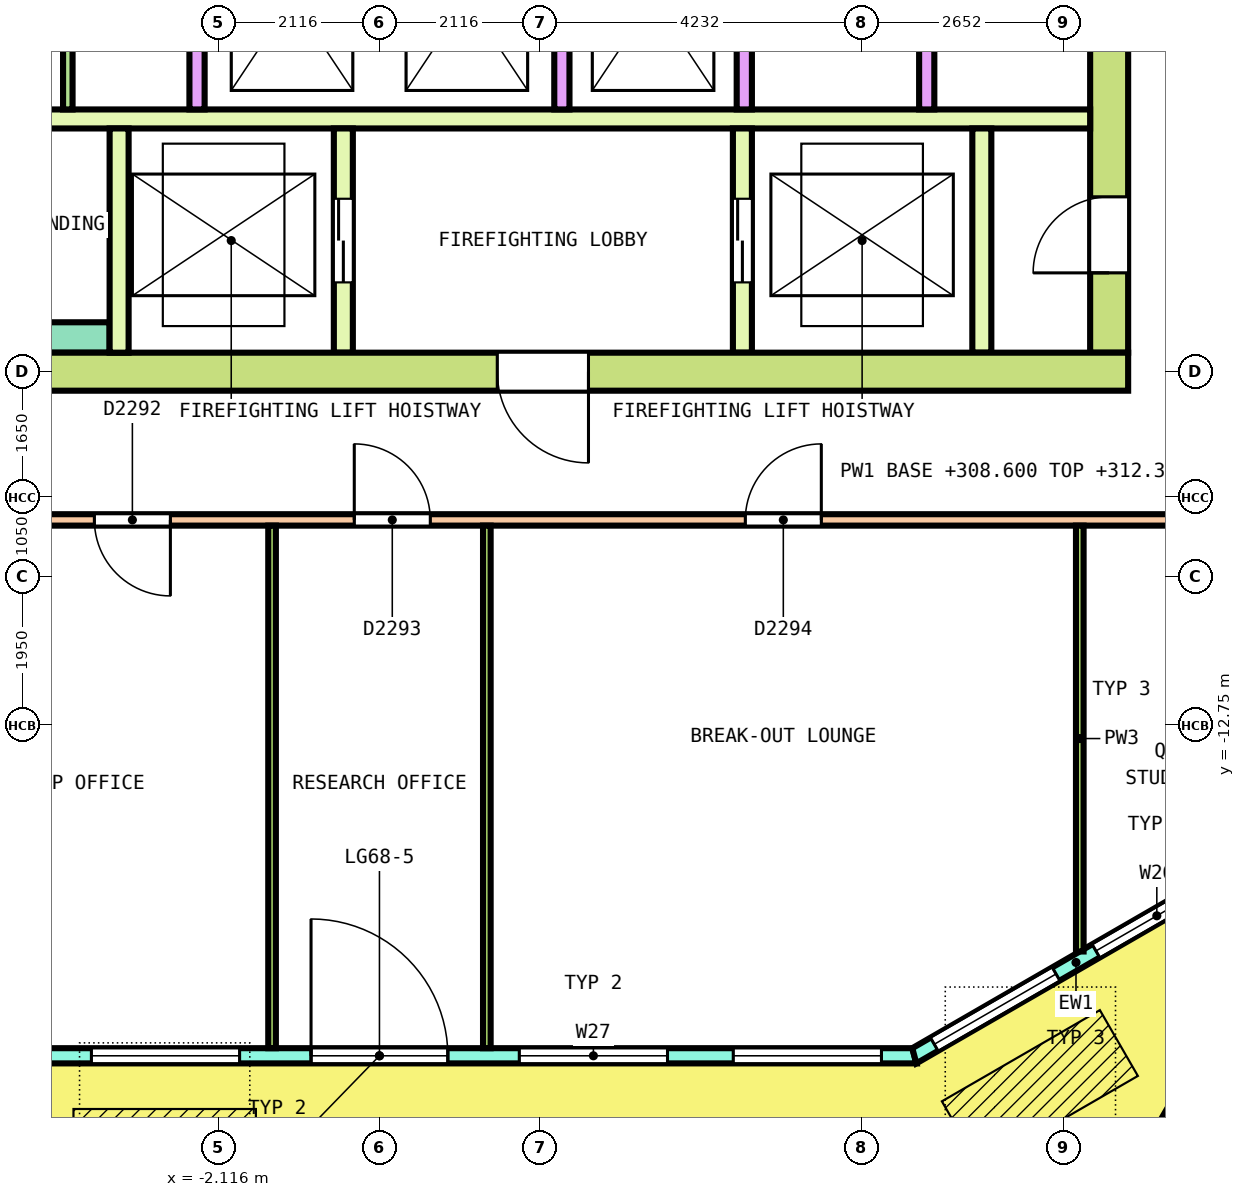
"""IFC4 building model, lengths in metres.
Left out: names, types, materials, properties, quantities, classifications, styles, units other than length and angle.
Written with IfcOpenShell. Run it as: python <this file> out.ifc"""

import sys

from ifc_helpers import new_model, si_unit, direction, frame, frame_2d, origin, origin_2d, place, context, subcontext, project, spatial, polyline, rectangle, outline, extrude, element, fill, save


model = new_model("IFC4")
c1 = context("Model", 3, precision=1e-05, world=origin(), true_north=direction((0.0, 1.0)))
c2 = subcontext(c1, "Body", "Model", "MODEL_VIEW")
j1 = project(units=[si_unit("LENGTHUNIT", "METRE"), si_unit("PLANEANGLEUNIT", "RADIAN")], contexts=[c1])
p1 = place(None, origin())
s1 = spatial("IfcSite", under=j1, at=p1, CompositionType="ELEMENT")
p2 = place(p1, origin())
s2 = spatial("IfcBuilding", under=s1, at=p2, CompositionType="ELEMENT")
p3 = place(p2, frame((0.0, 0.0, 308.6)))
s3 = spatial("IfcBuildingStorey", under=s2, at=p3, CompositionType="ELEMENT", Elevation=308.6)
p4 = place(p3, frame((10.564, -18.297, 0.0), z_axis=(-0.018115203871, -0.031350666477, 0.999344272561), x_axis=(0.865981217505, 0.499092579547, 0.031354871555)))
e1 = element("IfcColumn", 1, at=p4, inside=s3, PredefinedType="COLUMN", context=c2, shape_type="SweptSolid", body=[
    extrude(rectangle(XDim=0.85, YDim=0.85, at=origin_2d()), origin(), (0.0, 0.0, 1.0), 3.652),
])
p5 = place(p3, frame((-7.037, -17.1, 0.0), z_axis=(0.0, 0.0, 1.0), x_axis=(1.0, 0.0, 0.0)))
e2 = element("IfcWall", 2, at=p5, inside=s3, PredefinedType="SOLIDWALL", context=c2, shape_type="SweptSolid", body=[
    extrude(outline(polyline([(-0.027, -0.1), (0.982, -0.1), (1.991, -0.1), (3.0, -0.1), (4.01, -0.1), (5.019, -0.1), (6.028, -0.1), (7.037, -0.1), (8.046, -0.1), (9.055, -0.1), (10.064, -0.1), (11.074, -0.1), (12.083, -0.1), (13.092, -0.1), (14.101, -0.1), (14.047, 0.1), (13.046, 0.1), (12.044, 0.1), (11.043, 0.1), (10.042, 0.1), (9.04, 0.1), (8.039, 0.1), (7.037, 0.1), (6.036, 0.1), (5.034, 0.1), (4.033, 0.1), (3.031, 0.1), (2.03, 0.1), (1.028, 0.1), (0.027, 0.1), (-0.027, -0.1)])), origin(), (0.0, 0.0, 1.0), 3.7),
])
p6 = place(p5, frame((0.432, 0.0, 0.1)))
e3 = element("IfcOpeningElement", 3, at=p6, cuts=e2, PredefinedType="OPENING", context=c2, shape_type="SweptSolid", body=[
    extrude(rectangle(XDim=1.95, YDim=2.9, at=frame_2d((0.975, 1.45))), frame((0.0, 0.11, 0.0), z_axis=(0.0, -1.0, 0.0), x_axis=(1.0, 0.0, 0.0)), (0.0, 0.0, 1.0), 0.22),
])
p7 = place(p5, frame((3.247, 0.0, 0.1)))
e4 = element("IfcOpeningElement", 4, at=p7, cuts=e2, PredefinedType="OPENING", context=c2, shape_type="SweptSolid", body=[
    extrude(rectangle(XDim=1.95, YDim=2.9, at=frame_2d((0.975, 1.45))), frame((0.0, 0.11, 0.0), z_axis=(0.0, -1.0, 0.0), x_axis=(1.0, 0.0, 0.0)), (0.0, 0.0, 1.0), 0.22),
])
p8 = place(p5, frame((6.137, 0.0, 0.0)))
e5 = element("IfcOpeningElement", 5, at=p8, cuts=e2, PredefinedType="OPENING", context=c2, shape_type="SweptSolid", body=[
    extrude(rectangle(XDim=1.8, YDim=2.4, at=frame_2d((0.9, 1.2))), frame((0.0, 0.11, 0.0), z_axis=(0.0, -1.0, 0.0), x_axis=(1.0, 0.0, 0.0)), (0.0, 0.0, 1.0), 0.22),
])
p9 = place(p5, frame((6.137, 0.0, 2.55)))
e6 = element("IfcOpeningElement", 6, at=p9, cuts=e2, PredefinedType="OPENING", context=c2, shape_type="SweptSolid", body=[
    extrude(rectangle(XDim=1.8, YDim=0.45, at=frame_2d((0.9, 0.225))), frame((0.0, 0.11, 0.0), z_axis=(0.0, -1.0, 0.0), x_axis=(1.0, 0.0, 0.0)), (0.0, 0.0, 1.0), 0.22),
])
p10 = place(p5, frame((8.877, 0.0, 0.1)))
e7 = element("IfcOpeningElement", 7, at=p10, cuts=e2, PredefinedType="OPENING", context=c2, shape_type="SweptSolid", body=[
    extrude(rectangle(XDim=1.95, YDim=2.9, at=frame_2d((0.975, 1.45))), frame((0.0, 0.11, 0.0), z_axis=(0.0, -1.0, 0.0), x_axis=(1.0, 0.0, 0.0)), (0.0, 0.0, 1.0), 0.22),
])
p11 = place(p5, frame((11.691, 0.0, 0.1)))
e8 = element("IfcOpeningElement", 8, at=p11, cuts=e2, PredefinedType="OPENING", context=c2, shape_type="SweptSolid", body=[
    extrude(rectangle(XDim=1.95, YDim=2.9, at=frame_2d((0.975, 1.45))), frame((0.0, 0.11, 0.0), z_axis=(0.0, -1.0, 0.0), x_axis=(1.0, 0.0, 0.0)), (0.0, 0.0, 1.0), 0.22),
])
p12 = place(p3, frame((7.037, -17.1, 0.0), z_axis=(0.0, 0.0, 1.0), x_axis=(0.86601671623, 0.500015046984, 0.0)))
e9 = element("IfcWall", 9, at=p12, inside=s3, PredefinedType="SOLIDWALL", context=c2, shape_type="SweptSolid", body=[
    extrude(outline(polyline([(-0.027, -0.1), (1.214, -0.1), (2.456, -0.1), (3.697, -0.1), (4.938, -0.1), (4.885, 0.1), (3.67, 0.1), (2.456, 0.1), (1.241, 0.1), (0.027, 0.1), (-0.027, -0.1)])), origin(), (0.0, 0.0, 1.0), 3.7),
])
p13 = place(p12, frame((0.303, 0.0, 0.1)))
e10 = element("IfcOpeningElement", 10, at=p13, cuts=e9, PredefinedType="OPENING", context=c2, shape_type="SweptSolid", body=[
    extrude(rectangle(XDim=1.85, YDim=2.9, at=frame_2d((0.925, 1.45))), frame((0.0, 0.11, 0.0), z_axis=(0.0, -1.0, 0.0), x_axis=(1.0, 0.0, 0.0)), (0.0, 0.0, 1.0), 0.22),
])
p14 = place(p12, frame((2.759, 0.0, 0.1)))
e11 = element("IfcOpeningElement", 11, at=p14, cuts=e9, PredefinedType="OPENING", context=c2, shape_type="SweptSolid", body=[
    extrude(rectangle(XDim=1.85, YDim=2.9, at=frame_2d((0.925, 1.45))), frame((0.0, 0.11, 0.0), z_axis=(0.0, -1.0, 0.0), x_axis=(1.0, 0.0, 0.0)), (0.0, 0.0, 1.0), 0.22),
])
p15 = place(p3, frame((-9.85, -8.1, 0.0), z_axis=(0.0, 0.0, 1.0), x_axis=(1.0, 0.0, 0.0)))
e12 = element("IfcWall", 12, at=p15, inside=s3, PredefinedType="SHEAR", context=c2, shape_type="SweptSolid", body=[
    extrude(rectangle(XDim=19.7, YDim=0.5, at=frame_2d((9.85, 0.0))), origin(), (0.0, 0.0, 1.0), 3.7),
])
p16 = place(p15, frame((11.4, 0.0, 0.0)))
e13 = element("IfcOpeningElement", 13, at=p16, cuts=e12, PredefinedType="OPENING", context=c2, shape_type="SweptSolid", body=[
    extrude(rectangle(XDim=1.2, YDim=2.1, at=frame_2d((0.6, 1.05))), frame((0.0, 0.26, 0.0), z_axis=(0.0, -1.0, 0.0), x_axis=(1.0, 0.0, 0.0)), (0.0, 0.0, 1.0), 0.52),
])
p17 = place(p3, frame((9.6, -7.85, 0.0), z_axis=(0.0, 0.0, 1.0), x_axis=(0.0, 1.0, 0.0)))
e14 = element("IfcWall", 14, at=p17, inside=s3, PredefinedType="SHEAR", context=c2, shape_type="SweptSolid", body=[
    extrude(rectangle(XDim=15.7, YDim=0.5, at=frame_2d((7.85, 0.0))), origin(), (0.0, 0.0, 1.0), 3.7),
])
p18 = place(p17, frame((6.65, 0.0, 0.0)))
e15 = element("IfcOpeningElement", 15, at=p18, cuts=e14, PredefinedType="OPENING", context=c2, shape_type="SweptSolid", body=[
    extrude(rectangle(XDim=2.4, YDim=2.1, at=frame_2d((1.2, 1.05))), frame((0.0, 0.26, 0.0), z_axis=(0.0, -1.0, 0.0), x_axis=(1.0, 0.0, 0.0)), (0.0, 0.0, 1.0), 0.52),
])
p19 = place(p17, frame((13.55, 0.0, 0.0)))
e16 = element("IfcOpeningElement", 16, at=p19, cuts=e14, PredefinedType="OPENING", context=c2, shape_type="SweptSolid", body=[
    extrude(rectangle(XDim=1.2, YDim=2.1, at=frame_2d((0.6, 1.05))), frame((0.0, 0.26, 0.0), z_axis=(0.0, -1.0, 0.0), x_axis=(1.0, 0.0, 0.0)), (0.0, 0.0, 1.0), 0.52),
])
p20 = place(p17, frame((1.05, 0.0, 0.0)))
e17 = element("IfcOpeningElement", 17, at=p20, cuts=e14, PredefinedType="OPENING", context=c2, shape_type="SweptSolid", body=[
    extrude(rectangle(XDim=1.0, YDim=2.1, at=frame_2d((0.5, 1.05))), frame((0.0, 0.26, 0.0), z_axis=(0.0, -1.0, 0.0), x_axis=(1.0, 0.0, 0.0)), (0.0, 0.0, 1.0), 0.52),
])
p21 = place(p3, frame((-9.35, -4.775, 0.0), z_axis=(0.0, 0.0, 1.0), x_axis=(1.0, 0.0, 0.0)))
e18 = element("IfcWall", 18, at=p21, inside=s3, PredefinedType="SOLIDWALL", context=c2, shape_type="SweptSolid", body=[
    extrude(rectangle(XDim=18.7, YDim=0.25, at=frame_2d((9.35, 0.0))), origin(), (0.0, 0.0, 1.0), 3.7),
])
for number, where, z_axis, x_axis in (
    (19, (-2.4, -4.65, 0.0), (0.0, 0.0, 1.0), (0.0, 1.0, 0.0)),
    (20, (2.4, -4.65, 0.0), (0.0, 0.0, 1.0), (0.0, 1.0, 0.0)),
    (21, (4.8, -4.65, 0.0), (0.0, 0.0, 1.0), (0.0, 1.0, 0.0)),
    (22, (7.2, -4.65, 0.0), (0.0, 0.0, 1.0), (0.0, 1.0, 0.0)),
):
    element("IfcWall", number, at=place(p3, frame(where, z_axis=z_axis, x_axis=x_axis)), inside=s3, PredefinedType="SOLIDWALL", context=c2, shape_type="SweptSolid", body=[
        extrude(rectangle(XDim=2.9, YDim=0.2, at=frame_2d((1.45, 0.0))), origin(), (0.0, 0.0, 1.0), 3.7),
    ])
p22 = place(p3, frame((-9.35, -7.65, 0.0), z_axis=(0.0, 0.0, 1.0), x_axis=(1.0, 0.0, 0.0)))
e23 = element("IfcWall", 23, at=p22, inside=s3, PredefinedType="SOLIDWALL", context=c2, shape_type="SweptSolid", body=[
    extrude(rectangle(XDim=5.8, YDim=0.4, at=frame_2d((2.9, 0.0))), origin(), (0.0, 0.0, 1.0), 3.7),
])
p23 = place(p3, frame((-3.425, -7.85, 0.0), z_axis=(0.0, 0.0, 1.0), x_axis=(0.0, 1.0, 0.0)))
e24 = element("IfcWall", 24, at=p23, inside=s3, PredefinedType="SOLIDWALL", context=c2, shape_type="SweptSolid", body=[
    extrude(rectangle(XDim=2.95, YDim=0.25, at=frame_2d((1.475, 0.0))), origin(), (0.0, 0.0, 1.0), 3.7),
])
p24 = place(p3, frame((-0.475, -7.85, 0.0), z_axis=(0.0, 0.0, 1.0), x_axis=(0.0, 1.0, 0.0)))
e25 = element("IfcWall", 25, at=p24, inside=s3, PredefinedType="SOLIDWALL", context=c2, shape_type="SweptSolid", body=[
    extrude(rectangle(XDim=2.95, YDim=0.25, at=frame_2d((1.475, 0.0))), origin(), (0.0, 0.0, 1.0), 3.7),
])
p25 = place(p24, frame((0.925, 0.0, 0.0)))
e26 = element("IfcOpeningElement", 26, at=p25, cuts=e25, PredefinedType="OPENING", context=c2, shape_type="SweptSolid", body=[
    extrude(rectangle(XDim=1.1, YDim=2.1, at=frame_2d((0.55, 1.05))), frame((0.0, 0.135, 0.0), z_axis=(0.0, -1.0, 0.0), x_axis=(1.0, 0.0, 0.0)), (0.0, 0.0, 1.0), 0.27),
])
p26 = place(p3, frame((4.775, -7.85, 0.0), z_axis=(0.0, 0.0, 1.0), x_axis=(0.0, 1.0, 0.0)))
e27 = element("IfcWall", 27, at=p26, inside=s3, PredefinedType="SOLIDWALL", context=c2, shape_type="SweptSolid", body=[
    extrude(rectangle(XDim=2.95, YDim=0.25, at=frame_2d((1.475, 0.0))), origin(), (0.0, 0.0, 1.0), 3.7),
])
p27 = place(p26, frame((0.925, 0.0, 0.0)))
e28 = element("IfcOpeningElement", 28, at=p27, cuts=e27, PredefinedType="OPENING", context=c2, shape_type="SweptSolid", body=[
    extrude(rectangle(XDim=1.1, YDim=2.1, at=frame_2d((0.55, 1.05))), frame((0.0, 0.135, 0.0), z_axis=(0.0, -1.0, 0.0), x_axis=(1.0, 0.0, 0.0)), (0.0, 0.0, 1.0), 0.27),
])
p28 = place(p3, frame((7.925, -7.85, 0.0), z_axis=(0.0, 0.0, 1.0), x_axis=(0.0, 1.0, 0.0)))
e29 = element("IfcWall", 29, at=p28, inside=s3, PredefinedType="SOLIDWALL", context=c2, shape_type="SweptSolid", body=[
    extrude(rectangle(XDim=2.95, YDim=0.25, at=frame_2d((1.475, 0.0))), origin(), (0.0, 0.0, 1.0), 3.7),
])
p29 = place(p3, frame((-4.1, -4.65, 0.0), z_axis=(0.0, 0.0, 1.0), x_axis=(0.0, 1.0, 0.0)))
e30 = element("IfcWall", 30, at=p29, inside=s3, PredefinedType="PARTITIONING", context=c2, shape_type="SweptSolid", body=[
    extrude(rectangle(XDim=2.9, YDim=0.125, at=frame_2d((1.45, 0.0))), origin(), (0.0, 0.0, 1.0), 3.7),
])
p30 = place(p3, frame((-10.9, -10.05, 0.0), z_axis=(0.0, 0.0, 1.0), x_axis=(1.0, 0.0, 0.0)))
e31 = element("IfcWall", 31, at=p30, inside=s3, PredefinedType="PARTITIONING", context=c2, shape_type="SweptSolid", body=[
    extrude(rectangle(XDim=21.925, YDim=0.15, at=frame_2d((10.962, 0.0))), origin(), (0.0, 0.0, 1.0), 3.05),
])
p31 = place(p30, frame((1.94, 0.0, 0.0)))
e32 = element("IfcOpeningElement", 32, at=p31, cuts=e31, PredefinedType="OPENING", context=c2, shape_type="SweptSolid", body=[
    extrude(rectangle(XDim=1.0, YDim=2.1, at=frame_2d((0.5, 1.05))), frame((0.0, 0.085, 0.0), z_axis=(0.0, -1.0, 0.0), x_axis=(1.0, 0.0, 0.0)), (0.0, 0.0, 1.0), 0.17),
])
p32 = place(p30, frame((7.149, 0.0, 0.0)))
e33 = element("IfcOpeningElement", 33, at=p32, cuts=e31, PredefinedType="OPENING", context=c2, shape_type="SweptSolid", body=[
    extrude(rectangle(XDim=1.0, YDim=2.1, at=frame_2d((0.5, 1.05))), frame((0.0, 0.085, 0.0), z_axis=(0.0, -1.0, 0.0), x_axis=(1.0, 0.0, 0.0)), (0.0, 0.0, 1.0), 0.17),
])
p33 = place(p30, frame((10.569, 0.0, 0.0)))
e34 = element("IfcOpeningElement", 34, at=p33, cuts=e31, PredefinedType="OPENING", context=c2, shape_type="SweptSolid", body=[
    extrude(rectangle(XDim=1.0, YDim=2.1, at=frame_2d((0.5, 1.05))), frame((0.0, 0.085, 0.0), z_axis=(0.0, -1.0, 0.0), x_axis=(1.0, 0.0, 0.0)), (0.0, 0.0, 1.0), 0.17),
])
p34 = place(p30, frame((15.713, 0.0, 0.0)))
e35 = element("IfcOpeningElement", 35, at=p34, cuts=e31, PredefinedType="OPENING", context=c2, shape_type="SweptSolid", body=[
    extrude(rectangle(XDim=1.0, YDim=2.1, at=frame_2d((0.5, 1.05))), frame((0.0, 0.085, 0.0), z_axis=(0.0, -1.0, 0.0), x_axis=(1.0, 0.0, 0.0)), (0.0, 0.0, 1.0), 0.17),
])
for number, where, z_axis, x_axis in (
    (36, (-1.413, -17.0, 0.0), (0.0, 0.0, 1.0), (0.0, 1.0, 0.0)),
    (37, (1.413, -17.0, 0.0), (0.0, 0.0, 1.0), (0.0, 1.0, 0.0)),
):
    element("IfcWall", number, at=place(p3, frame(where, z_axis=z_axis, x_axis=x_axis)), inside=s3, PredefinedType="PARTITIONING", context=c2, shape_type="SweptSolid", body=[
        extrude(rectangle(XDim=6.875, YDim=0.1, at=frame_2d((3.438, 0.0))), origin(), (0.0, 0.0, 1.0), 3.05),
    ])
p35 = place(p3, frame((9.214, -15.728, 0.0), z_axis=(0.0, 0.0, 1.0), x_axis=(0.0, 1.0, 0.0)))
e38 = element("IfcWall", 38, at=p35, inside=s3, PredefinedType="PARTITIONING", context=c2, shape_type="SweptSolid", body=[
    extrude(rectangle(XDim=5.603, YDim=0.1, at=frame_2d((2.801, 0.0))), origin(), (0.0, 0.0, 1.0), 3.05),
])
p36 = place(p7, origin())
e39 = element("IfcWindow", 39, at=p36, inside=s3, PartitioningType="SINGLE_PANEL", PredefinedType="WINDOW", context=c2, shape_type="SweptSolid", body=[
    extrude(rectangle(XDim=1.95, YDim=2.9, at=frame_2d((0.975, 1.45))), frame((0.0, 0.03, 0.0), z_axis=(0.0, -1.0, 0.0), x_axis=(1.0, 0.0, 0.0)), (0.0, 0.0, 1.0), 0.06),
])
fill(e4, e39)
p37 = place(p8, origin())
e40 = element("IfcDoor", 40, at=p37, inside=s3, OperationType="DOUBLE_DOOR_SINGLE_SWING", PredefinedType="DOOR", context=c2, shape_type="SweptSolid", body=[
    extrude(rectangle(XDim=1.8, YDim=2.4, at=frame_2d((0.9, 1.2))), frame((0.0, 0.025, 0.0), z_axis=(0.0, -1.0, 0.0), x_axis=(1.0, 0.0, 0.0)), (0.0, 0.0, 1.0), 0.05),
])
fill(e5, e40)
p38 = place(p9, origin())
e41 = element("IfcWindow", 41, at=p38, inside=s3, PartitioningType="SINGLE_PANEL", PredefinedType="WINDOW", context=c2, shape_type="SweptSolid", body=[
    extrude(rectangle(XDim=1.8, YDim=0.45, at=frame_2d((0.9, 0.225))), frame((0.0, 0.03, 0.0), z_axis=(0.0, -1.0, 0.0), x_axis=(1.0, 0.0, 0.0)), (0.0, 0.0, 1.0), 0.06),
])
fill(e6, e41)
p39 = place(p10, origin())
e42 = element("IfcWindow", 42, at=p39, inside=s3, PartitioningType="SINGLE_PANEL", PredefinedType="WINDOW", context=c2, shape_type="SweptSolid", body=[
    extrude(rectangle(XDim=1.95, YDim=2.9, at=frame_2d((0.975, 1.45))), frame((0.0, 0.03, 0.0), z_axis=(0.0, -1.0, 0.0), x_axis=(1.0, 0.0, 0.0)), (0.0, 0.0, 1.0), 0.06),
])
fill(e7, e42)
p40 = place(p11, origin())
e43 = element("IfcWindow", 43, at=p40, inside=s3, PartitioningType="SINGLE_PANEL", PredefinedType="WINDOW", context=c2, shape_type="SweptSolid", body=[
    extrude(rectangle(XDim=1.95, YDim=2.9, at=frame_2d((0.975, 1.45))), frame((0.0, 0.03, 0.0), z_axis=(0.0, -1.0, 0.0), x_axis=(1.0, 0.0, 0.0)), (0.0, 0.0, 1.0), 0.06),
])
fill(e8, e43)
p41 = place(p13, origin())
e44 = element("IfcWindow", 44, at=p41, inside=s3, PartitioningType="SINGLE_PANEL", PredefinedType="WINDOW", context=c2, shape_type="SweptSolid", body=[
    extrude(rectangle(XDim=1.85, YDim=2.9, at=frame_2d((0.925, 1.45))), frame((0.0, 0.03, 0.0), z_axis=(0.0, -1.0, 0.0), x_axis=(1.0, 0.0, 0.0)), (0.0, 0.0, 1.0), 0.06),
])
fill(e10, e44)
p42 = place(p14, origin())
e45 = element("IfcWindow", 45, at=p42, inside=s3, PartitioningType="SINGLE_PANEL", PredefinedType="WINDOW", context=c2, shape_type="SweptSolid", body=[
    extrude(rectangle(XDim=1.85, YDim=2.9, at=frame_2d((0.925, 1.45))), frame((0.0, 0.03, 0.0), z_axis=(0.0, -1.0, 0.0), x_axis=(1.0, 0.0, 0.0)), (0.0, 0.0, 1.0), 0.06),
])
fill(e11, e45)
p43 = place(p25, origin())
e46 = element("IfcDoor", 46, at=p43, inside=s3, OperationType="DOUBLE_DOOR_SLIDING", PredefinedType="DOOR", context=c2, shape_type="SweptSolid", body=[
    extrude(rectangle(XDim=1.1, YDim=2.1, at=frame_2d((0.55, 1.05))), frame((0.0, 0.075, 0.0), z_axis=(0.0, -1.0, 0.0), x_axis=(1.0, 0.0, 0.0)), (0.0, 0.0, 1.0), 0.15),
])
fill(e26, e46)
p44 = place(p27, origin())
e47 = element("IfcDoor", 47, at=p44, inside=s3, OperationType="DOUBLE_DOOR_SLIDING", PredefinedType="DOOR", context=c2, shape_type="SweptSolid", body=[
    extrude(rectangle(XDim=1.1, YDim=2.1, at=frame_2d((0.55, 1.05))), frame((0.0, 0.075, 0.0), z_axis=(0.0, -1.0, 0.0), x_axis=(1.0, 0.0, 0.0)), (0.0, 0.0, 1.0), 0.15),
])
fill(e28, e47)
p45 = place(p16, origin())
e48 = element("IfcDoor", 48, at=p45, inside=s3, OperationType="SINGLE_SWING_RIGHT", PredefinedType="DOOR", context=c2, shape_type="SweptSolid", body=[
    extrude(rectangle(XDim=1.2, YDim=2.1, at=frame_2d((0.6, 1.05))), frame((0.0, 0.2, 0.0), z_axis=(0.0, -1.0, 0.0), x_axis=(1.0, 0.0, 0.0)), (0.0, 0.0, 1.0), 0.4),
])
fill(e13, e48)
p46 = place(p20, origin())
e49 = element("IfcDoor", 49, at=p46, inside=s3, OperationType="SINGLE_SWING_RIGHT", PredefinedType="DOOR", context=c2, shape_type="SweptSolid", body=[
    extrude(rectangle(XDim=1.0, YDim=2.1, at=frame_2d((0.5, 1.05))), frame((0.0, 0.2, 0.0), z_axis=(0.0, -1.0, 0.0), x_axis=(1.0, 0.0, 0.0)), (0.0, 0.0, 1.0), 0.4),
])
fill(e17, e49)
p47 = place(p32, origin())
e50 = element("IfcDoor", 50, at=p47, inside=s3, OperationType="SINGLE_SWING_RIGHT", PredefinedType="DOOR", context=c2, shape_type="SweptSolid", body=[
    extrude(rectangle(XDim=1.0, YDim=2.1, at=frame_2d((0.5, 1.05))), frame((0.0, 0.025, 0.0), z_axis=(0.0, -1.0, 0.0), x_axis=(1.0, 0.0, 0.0)), (0.0, 0.0, 1.0), 0.05),
])
fill(e33, e50)
p48 = place(p33, origin())
e51 = element("IfcDoor", 51, at=p48, inside=s3, OperationType="SINGLE_SWING_RIGHT", PredefinedType="DOOR", context=c2, shape_type="SweptSolid", body=[
    extrude(rectangle(XDim=1.0, YDim=2.1, at=frame_2d((0.5, 1.05))), frame((0.0, 0.025, 0.0), z_axis=(0.0, -1.0, 0.0), x_axis=(1.0, 0.0, 0.0)), (0.0, 0.0, 1.0), 0.05),
])
fill(e34, e51)
p49 = place(p34, origin())
e52 = element("IfcDoor", 52, at=p49, inside=s3, OperationType="SINGLE_SWING_RIGHT", PredefinedType="DOOR", context=c2, shape_type="SweptSolid", body=[
    extrude(rectangle(XDim=1.0, YDim=2.1, at=frame_2d((0.5, 1.05))), frame((0.0, 0.025, 0.0), z_axis=(0.0, -1.0, 0.0), x_axis=(1.0, 0.0, 0.0)), (0.0, 0.0, 1.0), 0.05),
])
fill(e35, e52)
save(model, sys.argv[1])
